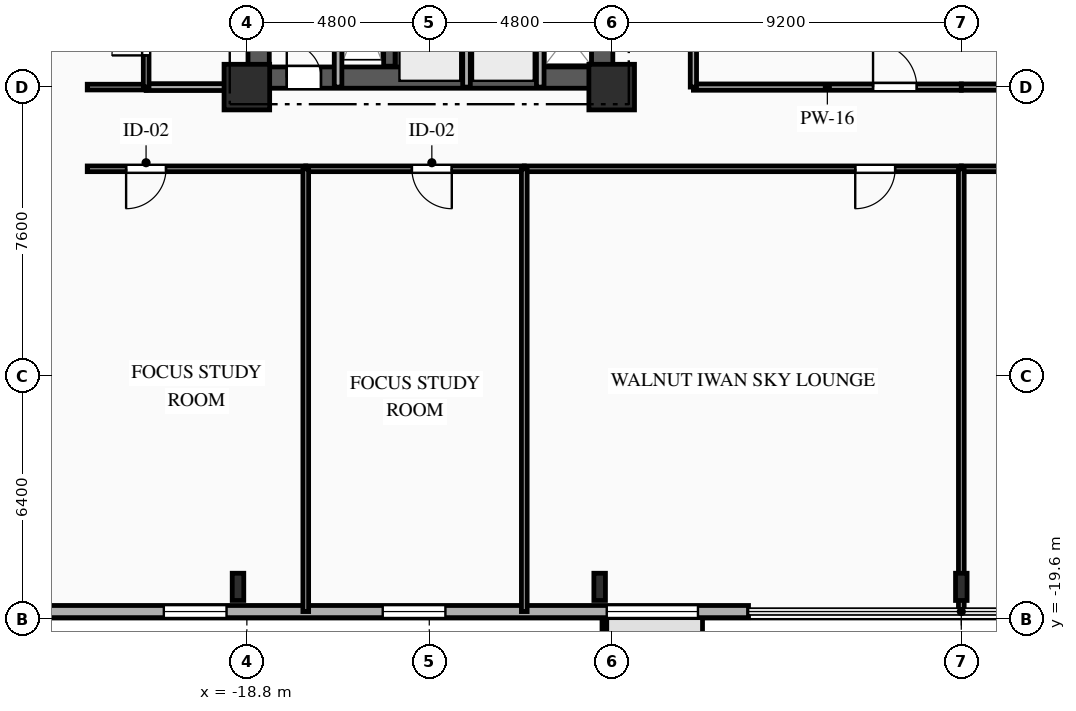
"""IFC4 building model, lengths in metres.
Left out: names, types, materials, properties, quantities, classifications, styles, units other than length and angle.
Written with IfcOpenShell. Run it as: python <this file> out.ifc"""

import sys

from ifc_helpers import new_model, si_unit, direction, frame, frame_2d, origin, origin_2d, place, context, subcontext, project, spatial, rectangle, i_section, extrude, element, fill, save


model = new_model("IFC4")
c1 = context("Model", 3, precision=1e-05, world=origin(), true_north=direction((0.0, 1.0)))
c2 = subcontext(c1, "Body", "Model", "MODEL_VIEW")
j1 = project(units=[si_unit("LENGTHUNIT", "METRE"), si_unit("PLANEANGLEUNIT", "RADIAN")], contexts=[c1])
p1 = place(None, origin())
s1 = spatial("IfcSite", under=j1, at=p1, CompositionType="ELEMENT")
p2 = place(p1, origin())
s2 = spatial("IfcBuilding", under=s1, at=p2, CompositionType="ELEMENT")
p3 = place(p2, frame((0.0, 0.0, 43.75)))
s3 = spatial("IfcBuildingStorey", under=s2, at=p3, CompositionType="ELEMENT", Elevation=43.75)
for number, where, z_axis, x_axis in (
    (1, (-18.8, -5.6, 0.0), (0.0, 0.0, 1.0), (1.0, 0.0, 0.0)),
    (2, (-9.2, -5.6, 0.0), (0.0, 0.0, 1.0), (1.0, 0.0, 0.0)),
):
    element("IfcColumn", number, at=place(p3, frame(where, z_axis=z_axis, x_axis=x_axis)), inside=s3, PredefinedType="COLUMN", context=c2, shape_type="SweptSolid", body=[
        extrude(rectangle(XDim=1.2, YDim=1.2, at=origin_2d()), origin(), (0.0, 0.0, 1.0), 3.35),
    ])
for number, where, z_axis, x_axis in (
    (3, (-19.033, -18.75, 0.0), (0.0, 0.0, 1.0), (1.0, 0.0, 0.0)),
    (4, (-9.517, -18.75, 0.0), (0.0, 0.0, 1.0), (1.0, 0.0, 0.0)),
    (5, (0.0, -18.75, 0.0), (0.0, 0.0, 1.0), (1.0, 0.0, 0.0)),
):
    element("IfcColumn", number, at=place(p3, frame(where, z_axis=z_axis, x_axis=x_axis)), inside=s3, PredefinedType="COLUMN", context=c2, shape_type="SweptSolid", body=[
        extrude(i_section(OverallWidth=0.304, OverallDepth=0.716, WebThickness=0.021, FlangeThickness=0.04, FilletRadius=0.027, at=origin_2d()), origin(), (0.0, 0.0, 1.0), 3.35),
    ])
p4 = place(p3, frame((-5.6, -19.4, 0.0), z_axis=(0.0, 0.0, 1.0), x_axis=(-1.0, 0.0, 0.0)))
e6 = element("IfcWall", 6, at=p4, inside=s3, PredefinedType="SOLIDWALL", context=c2, shape_type="SweptSolid", body=[
    extrude(rectangle(XDim=23.6, YDim=0.32, at=frame_2d((11.8, 0.0))), origin(), (0.0, 0.0, 1.0), 3.035),
])
p5 = place(p4, frame((1.33, 0.0, 0.85)))
e7 = element("IfcOpeningElement", 7, at=p5, cuts=e6, PredefinedType="OPENING", context=c2, shape_type="SweptSolid", body=[
    extrude(rectangle(XDim=2.4, YDim=1.95, at=frame_2d((1.2, 0.975))), frame((0.0, 0.17, 0.0), z_axis=(0.0, -1.0, 0.0), x_axis=(1.0, 0.0, 0.0)), (0.0, 0.0, 1.0), 0.34),
])
p6 = place(p4, frame((7.975, 0.0, 0.85)))
e8 = element("IfcOpeningElement", 8, at=p6, cuts=e6, PredefinedType="OPENING", context=c2, shape_type="SweptSolid", body=[
    extrude(rectangle(XDim=1.65, YDim=1.85, at=frame_2d((0.825, 0.925))), frame((0.0, 0.17, 0.0), z_axis=(0.0, -1.0, 0.0), x_axis=(1.0, 0.0, 0.0)), (0.0, 0.0, 1.0), 0.34),
])
p7 = place(p4, frame((13.735, 0.0, 0.85)))
e9 = element("IfcOpeningElement", 9, at=p7, cuts=e6, PredefinedType="OPENING", context=c2, shape_type="SweptSolid", body=[
    extrude(rectangle(XDim=1.65, YDim=1.85, at=frame_2d((0.825, 0.925))), frame((0.0, 0.17, 0.0), z_axis=(0.0, -1.0, 0.0), x_axis=(1.0, 0.0, 0.0)), (0.0, 0.0, 1.0), 0.34),
])
p8 = place(p3, frame((-18.8, -5.35, 0.0), z_axis=(0.0, 0.0, 1.0), x_axis=(1.0, 0.0, 0.0)))
e10 = element("IfcWall", 10, at=p8, inside=s3, PredefinedType="SHEAR", context=c2, shape_type="SweptSolid", body=[
    extrude(rectangle(XDim=9.6, YDim=0.56, at=frame_2d((4.8, 0.0))), origin(), (0.0, 0.0, 1.0), 3.035),
])
p9 = place(p8, frame((1.05, 0.0, 0.0)))
e11 = element("IfcOpeningElement", 11, at=p9, cuts=e10, PredefinedType="OPENING", context=c2, shape_type="SweptSolid", body=[
    extrude(rectangle(XDim=0.9, YDim=2.1, at=frame_2d((0.45, 1.05))), frame((0.0, 0.29, 0.0), z_axis=(0.0, -1.0, 0.0), x_axis=(1.0, 0.0, 0.0)), (0.0, 0.0, 1.0), 0.58),
])
p10 = place(p3, frame((-18.49, -5.05, 0.0), z_axis=(0.0, 0.0, 1.0), x_axis=(0.0, 1.0, 0.0)))
e12 = element("IfcWall", 12, at=p10, inside=s3, PredefinedType="SHEAR", context=c2, shape_type="SweptSolid", body=[
    extrude(rectangle(XDim=10.1, YDim=0.56, at=frame_2d((5.05, 0.0))), origin(), (0.0, 0.0, 1.0), 3.035),
])
p11 = place(p3, frame((-9.45, -5.05, 0.0), z_axis=(0.0, 0.0, 1.0), x_axis=(0.0, 1.0, 0.0)))
e13 = element("IfcWall", 13, at=p11, inside=s3, PredefinedType="SHEAR", context=c2, shape_type="SweptSolid", body=[
    extrude(rectangle(XDim=10.1, YDim=0.56, at=frame_2d((5.05, 0.0))), origin(), (0.0, 0.0, 1.0), 3.035),
])
p12 = place(p11, frame((7.175, 0.0, 0.0)))
e14 = element("IfcOpeningElement", 14, at=p12, cuts=e13, PredefinedType="OPENING", context=c2, shape_type="SweptSolid", body=[
    extrude(rectangle(XDim=0.9, YDim=2.1, at=frame_2d((0.45, 1.05))), frame((0.0, 0.29, 0.0), z_axis=(0.0, -1.0, 0.0), x_axis=(1.0, 0.0, 0.0)), (0.0, 0.0, 1.0), 0.58),
])
p13 = place(p11, frame((2.4, 0.0, 0.0)))
e15 = element("IfcOpeningElement", 15, at=p13, cuts=e13, PredefinedType="OPENING", context=c2, shape_type="SweptSolid", body=[
    extrude(rectangle(XDim=1.2, YDim=2.15, at=frame_2d((0.6, 1.075))), frame((0.0, 0.29, 0.0), z_axis=(0.0, -1.0, 0.0), x_axis=(1.0, 0.0, 0.0)), (0.0, 0.0, 1.0), 0.58),
])
p14 = place(p3, frame((-15.05, -5.05, 0.0), z_axis=(0.0, 0.0, 1.0), x_axis=(0.0, 1.0, 0.0)))
e16 = element("IfcWall", 16, at=p14, inside=s3, PredefinedType="SHEAR", context=c2, shape_type="SweptSolid", body=[
    extrude(rectangle(XDim=10.1, YDim=0.3, at=frame_2d((5.05, 0.0))), origin(), (0.0, 0.0, 1.0), 3.035),
])
p15 = place(p3, frame((-16.4, -5.6, 0.0), z_axis=(0.0, 0.0, 1.0), x_axis=(0.0, 1.0, 0.0)))
e17 = element("IfcWall", 17, at=p15, inside=s3, PredefinedType="PARTITIONING", context=c2, shape_type="SweptSolid", body=[
    extrude(rectangle(XDim=3.49, YDim=0.2, at=frame_2d((1.745, 0.0))), origin(), (0.0, 0.0, 1.0), 3.035),
])
for number, where, z_axis, x_axis in (
    (18, (-13.02, -5.6, 0.0), (0.0, 0.0, 1.0), (0.0, 1.0, 0.0)),
    (19, (-11.08, -5.6, 0.0), (0.0, 0.0, 1.0), (0.0, 1.0, 0.0)),
):
    element("IfcWall", number, at=place(p3, frame(where, z_axis=z_axis, x_axis=x_axis)), inside=s3, PredefinedType="PARTITIONING", context=c2, shape_type="SweptSolid", body=[
        extrude(rectangle(XDim=2.25, YDim=0.2, at=frame_2d((1.125, 0.0))), origin(), (0.0, 0.0, 1.0), 3.035),
    ])
p16 = place(p3, frame((-21.45, -5.6, 0.0), z_axis=(0.0, 0.0, 1.0), x_axis=(1.0, 0.0, 0.0)))
e20 = element("IfcWall", 20, at=p16, inside=s3, PredefinedType="PARTITIONING", context=c2, shape_type="SweptSolid", body=[
    extrude(rectangle(XDim=2.65, YDim=0.18, at=frame_2d((1.325, 0.0))), origin(), (0.0, 0.0, 1.0), 3.035),
])
p17 = place(p3, frame((-23.0, -5.6, 0.0), z_axis=(0.0, 0.0, 1.0), x_axis=(1.0, 0.0, 0.0)))
e21 = element("IfcWall", 21, at=p17, inside=s3, PredefinedType="PLUMBINGWALL", context=c2, shape_type="SweptSolid", body=[
    extrude(rectangle(XDim=1.55, YDim=0.15, at=frame_2d((0.775, 0.0))), origin(), (0.0, 0.0, 1.0), 3.035),
])
p18 = place(p3, frame((-17.25, -7.75, 0.0), z_axis=(0.0, 0.0, 1.0), x_axis=(-1.0, 0.0, 0.0)))
e22 = element("IfcWall", 22, at=p18, inside=s3, PredefinedType="PARTITIONING", context=c2, shape_type="SweptSolid", body=[
    extrude(rectangle(XDim=5.75, YDim=0.15, at=frame_2d((2.875, 0.0))), origin(), (0.0, 0.0, 1.0), 3.035),
])
p19 = place(p18, frame((3.677, 0.0, 0.0)))
e23 = element("IfcOpeningElement", 23, at=p19, cuts=e22, PredefinedType="OPENING", context=c2, shape_type="SweptSolid", body=[
    extrude(rectangle(XDim=1.05, YDim=2.15, at=frame_2d((0.525, 1.075))), frame((0.0, 0.085, 0.0), z_axis=(0.0, -1.0, 0.0), x_axis=(1.0, 0.0, 0.0)), (0.0, 0.0, 1.0), 0.17),
])
p20 = place(p3, frame((-11.5, -7.75, 0.0), z_axis=(0.0, 0.0, 1.0), x_axis=(-1.0, 0.0, 0.0)))
e24 = element("IfcWall", 24, at=p20, inside=s3, PredefinedType="PARTITIONING", context=c2, shape_type="SweptSolid", body=[
    extrude(rectangle(XDim=5.75, YDim=0.15, at=frame_2d((2.875, 0.0))), origin(), (0.0, 0.0, 1.0), 3.035),
])
p21 = place(p20, frame((1.907, 0.0, 0.0)))
e25 = element("IfcOpeningElement", 25, at=p21, cuts=e24, PredefinedType="OPENING", context=c2, shape_type="SweptSolid", body=[
    extrude(rectangle(XDim=1.05, YDim=2.15, at=frame_2d((0.525, 1.075))), frame((0.0, 0.085, 0.0), z_axis=(0.0, -1.0, 0.0), x_axis=(1.0, 0.0, 0.0)), (0.0, 0.0, 1.0), 0.17),
])
p22 = place(p3, frame((0.0, -7.75, 0.0), z_axis=(0.0, 0.0, 1.0), x_axis=(-1.0, 0.0, 0.0)))
e26 = element("IfcWall", 26, at=p22, inside=s3, PredefinedType="PARTITIONING", context=c2, shape_type="SweptSolid", body=[
    extrude(rectangle(XDim=11.5, YDim=0.15, at=frame_2d((5.75, 0.0))), origin(), (0.0, 0.0, 1.0), 3.035),
])
p23 = place(p22, frame((1.741, 0.0, 0.0)))
e27 = element("IfcOpeningElement", 27, at=p23, cuts=e26, PredefinedType="OPENING", context=c2, shape_type="SweptSolid", body=[
    extrude(rectangle(XDim=1.05, YDim=2.15, at=frame_2d((0.525, 1.075))), frame((0.0, 0.085, 0.0), z_axis=(0.0, -1.0, 0.0), x_axis=(1.0, 0.0, 0.0)), (0.0, 0.0, 1.0), 0.17),
])
p24 = place(p3, frame((-7.05, -5.6, 0.0), z_axis=(0.0, 0.0, 1.0), x_axis=(1.0, 0.0, 0.0)))
e28 = element("IfcWall", 28, at=p24, inside=s3, PredefinedType="PARTITIONING", context=c2, shape_type="SweptSolid", body=[
    extrude(rectangle(XDim=7.05, YDim=0.165, at=frame_2d((3.525, 0.0))), origin(), (0.0, 0.0, 1.0), 2.52),
])
p25 = place(p24, frame((4.728, 0.0, 0.0)))
e29 = element("IfcOpeningElement", 29, at=p25, cuts=e28, PredefinedType="OPENING", context=c2, shape_type="SweptSolid", body=[
    extrude(rectangle(XDim=1.15, YDim=2.15, at=frame_2d((0.575, 1.075))), frame((0.0, 0.093, 0.0), z_axis=(0.0, -1.0, 0.0), x_axis=(1.0, 0.0, 0.0)), (0.0, 0.0, 1.0), 0.185),
])
p26 = place(p3, frame((11.5, -7.75, 0.0), z_axis=(0.0, 0.0, 1.0), x_axis=(-1.0, 0.0, 0.0)))
e30 = element("IfcWall", 30, at=p26, inside=s3, PredefinedType="PARTITIONING", context=c2, shape_type="SweptSolid", body=[
    extrude(rectangle(XDim=11.5, YDim=0.15, at=frame_2d((5.75, 0.0))), origin(), (0.0, 0.0, 1.0), 3.035),
])
p27 = place(p26, frame((8.709, 0.0, 0.0)))
e31 = element("IfcOpeningElement", 31, at=p27, cuts=e30, PredefinedType="OPENING", context=c2, shape_type="SweptSolid", body=[
    extrude(rectangle(XDim=1.05, YDim=2.15, at=frame_2d((0.525, 1.075))), frame((0.0, 0.085, 0.0), z_axis=(0.0, -1.0, 0.0), x_axis=(1.0, 0.0, 0.0)), (0.0, 0.0, 1.0), 0.17),
])
p28 = place(p3, frame((0.0, -5.6, 0.0), z_axis=(0.0, 0.0, 1.0), x_axis=(1.0, 0.0, 0.0)))
e32 = element("IfcWall", 32, at=p28, inside=s3, PredefinedType="PARTITIONING", context=c2, shape_type="SweptSolid", body=[
    extrude(rectangle(XDim=7.05, YDim=0.165, at=frame_2d((3.525, 0.0))), origin(), (0.0, 0.0, 1.0), 2.52),
])
p29 = place(p3, frame((-7.05, 1.45, 0.0), z_axis=(0.0, 0.0, 1.0), x_axis=(0.0, -1.0, 0.0)))
e33 = element("IfcWall", 33, at=p29, inside=s3, PredefinedType="PARTITIONING", context=c2, shape_type="SweptSolid", body=[
    extrude(rectangle(XDim=7.05, YDim=0.165, at=frame_2d((3.525, 0.0))), origin(), (0.0, 0.0, 1.0), 3.035),
])
p30 = place(p3, frame((-21.45, -5.6, 0.0), z_axis=(0.0, 0.0, 1.0), x_axis=(0.0, 1.0, 0.0)))
e34 = element("IfcWall", 34, at=p30, inside=s3, PredefinedType="PLUMBINGWALL", context=c2, shape_type="SweptSolid", body=[
    extrude(rectangle(XDim=2.35, YDim=0.15, at=frame_2d((1.175, 0.0))), origin(), (0.0, 0.0, 1.0), 3.035),
])
p31 = place(p30, frame((0.834, 0.0, 0.0)))
e35 = element("IfcOpeningElement", 35, at=p31, cuts=e34, PredefinedType="OPENING", context=c2, shape_type="SweptSolid", body=[
    extrude(rectangle(XDim=0.9, YDim=2.1, at=frame_2d((0.45, 1.05))), frame((0.0, 0.085, 0.0), z_axis=(0.0, -1.0, 0.0), x_axis=(1.0, 0.0, 0.0)), (0.0, 0.0, 1.0), 0.17),
])
for number, where, z_axis, x_axis in (
    (36, (-17.25, -7.75, 0.0), (0.0, 0.0, 1.0), (0.0, -1.0, 0.0)),
    (37, (-11.5, -7.75, 0.0), (0.0, 0.0, 1.0), (0.0, -1.0, 0.0)),
    (38, (0.0, -7.75, 0.0), (0.0, 0.0, 1.0), (0.0, -1.0, 0.0)),
):
    element("IfcWall", number, at=place(p3, frame(where, z_axis=z_axis, x_axis=x_axis)), inside=s3, PredefinedType="PARTITIONING", context=c2, shape_type="SweptSolid", body=[
        extrude(rectangle(XDim=11.65, YDim=0.15, at=frame_2d((5.825, 0.0))), origin(), (0.0, 0.0, 1.0), 3.035),
    ])
p32 = place(p5, origin())
e39 = element("IfcWindow", 39, at=p32, inside=s3, PartitioningType="SINGLE_PANEL", PredefinedType="WINDOW", context=c2, shape_type="SweptSolid", body=[
    extrude(rectangle(XDim=2.4, YDim=1.95, at=frame_2d((1.2, 0.975))), frame((0.0, 0.03, 0.0), z_axis=(0.0, -1.0, 0.0), x_axis=(1.0, 0.0, 0.0)), (0.0, 0.0, 1.0), 0.06),
])
fill(e7, e39)
p33 = place(p6, origin())
e40 = element("IfcWindow", 40, at=p33, inside=s3, PartitioningType="SINGLE_PANEL", PredefinedType="WINDOW", context=c2, shape_type="SweptSolid", body=[
    extrude(rectangle(XDim=1.65, YDim=1.85, at=frame_2d((0.825, 0.925))), frame((0.0, 0.03, 0.0), z_axis=(0.0, -1.0, 0.0), x_axis=(1.0, 0.0, 0.0)), (0.0, 0.0, 1.0), 0.06),
])
fill(e8, e40)
p34 = place(p7, origin())
e41 = element("IfcWindow", 41, at=p34, inside=s3, PartitioningType="SINGLE_PANEL", PredefinedType="WINDOW", context=c2, shape_type="SweptSolid", body=[
    extrude(rectangle(XDim=1.65, YDim=1.85, at=frame_2d((0.825, 0.925))), frame((0.0, 0.03, 0.0), z_axis=(0.0, -1.0, 0.0), x_axis=(1.0, 0.0, 0.0)), (0.0, 0.0, 1.0), 0.06),
])
fill(e9, e41)
p35 = place(p9, origin())
e42 = element("IfcDoor", 42, at=p35, inside=s3, OperationType="SINGLE_SWING_LEFT", PredefinedType="DOOR", context=c2, shape_type="SweptSolid", body=[
    extrude(rectangle(XDim=0.9, YDim=2.1, at=frame_2d((0.45, 1.05))), frame((0.0, 0.025, 0.0), z_axis=(0.0, -1.0, 0.0), x_axis=(1.0, 0.0, 0.0)), (0.0, 0.0, 1.0), 0.05),
])
fill(e11, e42)
p36 = place(p19, origin())
e43 = element("IfcDoor", 43, at=p36, inside=s3, OperationType="SINGLE_SWING_RIGHT", PredefinedType="DOOR", context=c2, shape_type="SweptSolid", body=[
    extrude(rectangle(XDim=1.05, YDim=2.15, at=frame_2d((0.525, 1.075))), frame((0.0, 0.025, 0.0), z_axis=(0.0, -1.0, 0.0), x_axis=(1.0, 0.0, 0.0)), (0.0, 0.0, 1.0), 0.05),
])
fill(e23, e43)
p37 = place(p21, origin())
e44 = element("IfcDoor", 44, at=p37, inside=s3, OperationType="SINGLE_SWING_LEFT", PredefinedType="DOOR", context=c2, shape_type="SweptSolid", body=[
    extrude(rectangle(XDim=1.05, YDim=2.15, at=frame_2d((0.525, 1.075))), frame((0.0, 0.025, 0.0), z_axis=(0.0, -1.0, 0.0), x_axis=(1.0, 0.0, 0.0)), (0.0, 0.0, 1.0), 0.05),
])
fill(e25, e44)
p38 = place(p23, origin())
e45 = element("IfcDoor", 45, at=p38, inside=s3, OperationType="SINGLE_SWING_RIGHT", PredefinedType="DOOR", context=c2, shape_type="SweptSolid", body=[
    extrude(rectangle(XDim=1.05, YDim=2.15, at=frame_2d((0.525, 1.075))), frame((0.0, 0.025, 0.0), z_axis=(0.0, -1.0, 0.0), x_axis=(1.0, 0.0, 0.0)), (0.0, 0.0, 1.0), 0.05),
])
fill(e27, e45)
p39 = place(p25, origin())
e46 = element("IfcDoor", 46, at=p39, inside=s3, OperationType="SINGLE_SWING_LEFT", PredefinedType="DOOR", context=c2, shape_type="SweptSolid", body=[
    extrude(rectangle(XDim=1.15, YDim=2.15, at=frame_2d((0.575, 1.075))), frame((0.0, 0.025, 0.0), z_axis=(0.0, -1.0, 0.0), x_axis=(1.0, 0.0, 0.0)), (0.0, 0.0, 1.0), 0.05),
])
fill(e29, e46)
p40 = place(p31, origin())
e47 = element("IfcDoor", 47, at=p40, inside=s3, OperationType="SINGLE_SWING_LEFT", PredefinedType="DOOR", context=c2, shape_type="SweptSolid", body=[
    extrude(rectangle(XDim=0.9, YDim=2.1, at=frame_2d((0.45, 1.05))), frame((0.0, 0.025, 0.0), z_axis=(0.0, -1.0, 0.0), x_axis=(1.0, 0.0, 0.0)), (0.0, 0.0, 1.0), 0.05),
])
fill(e35, e47)
save(model, sys.argv[1])
